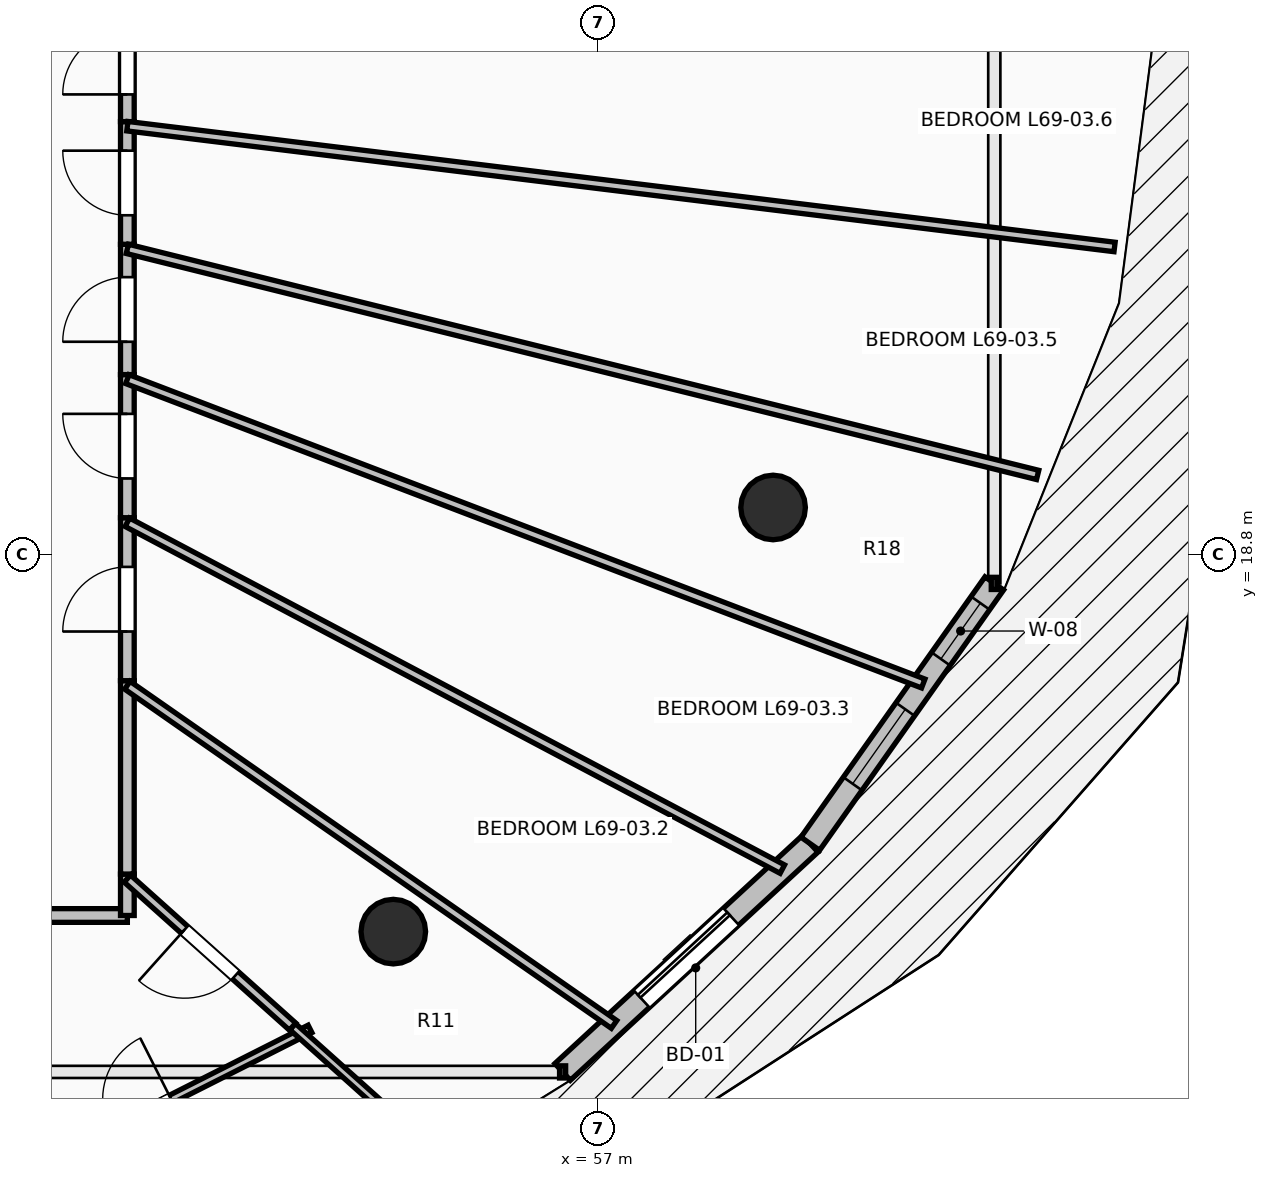
"""IFC4 building model, lengths in metres.
Left out: names, types, materials, properties, quantities, classifications, styles, units other than length and angle.
Written with IfcOpenShell. Run it as: python <this file> out.ifc"""

import sys

from ifc_helpers import new_model, si_unit, direction, frame, frame_2d, origin, origin_2d, place, context, subcontext, project, spatial, rectangle, circle, extrude, element, fill, save


model = new_model("IFC4")
c1 = context("Model", 3, precision=1e-05, world=origin(), true_north=direction((0.0, 1.0)))
c2 = subcontext(c1, "Body", "Model", "MODEL_VIEW")
j1 = project(units=[si_unit("LENGTHUNIT", "METRE"), si_unit("PLANEANGLEUNIT", "RADIAN")], contexts=[c1])
p1 = place(None, origin())
s1 = spatial("IfcSite", under=j1, at=p1, CompositionType="ELEMENT")
p2 = place(p1, origin())
s2 = spatial("IfcBuilding", under=s1, at=p2, CompositionType="ELEMENT")
p3 = place(p2, frame((0.0, 0.0, 255.55)))
s3 = spatial("IfcBuildingStorey", under=s2, at=p3, CompositionType="ELEMENT", Elevation=255.55)
for number, where, z_axis, x_axis in (
    (1, (54.299, 13.838, 0.0), (0.0, 0.0, 1.0), (0.707, -0.707, 0.0)),
    (2, (59.295, 19.418, 0.0), (0.0, 0.0, 1.0), (0.924, -0.383, 0.0)),
):
    element("IfcColumn", number, at=place(p3, frame(where, z_axis=z_axis, x_axis=x_axis)), inside=s3, PredefinedType="COLUMN", context=c2, shape_type="SweptSolid", body=[
        extrude(circle(Radius=0.425, at=origin_2d()), origin(), (0.0, 0.0, 1.0), 3.55),
    ])
p4 = place(p3, frame((56.526, 11.992, 0.0), z_axis=(0.0, 0.0, 1.0), x_axis=(0.735445373611, 0.677584018727, 0.0)))
e3 = element("IfcWall", 3, at=p4, inside=s3, PredefinedType="STANDARD", context=c2, shape_type="SweptSolid", body=[
    extrude(rectangle(XDim=4.43, YDim=0.3, at=frame_2d((2.215, 0.0))), origin(), (0.0, 0.0, 1.0), 3.29),
])
p5 = place(p4, frame((1.415, 0.0, 0.0)))
e4 = element("IfcOpeningElement", 4, at=p5, cuts=e3, PredefinedType="OPENING", context=c2, shape_type="SweptSolid", body=[
    extrude(rectangle(XDim=1.6, YDim=2.3, at=frame_2d((0.8, 1.15))), frame((0.0, 0.165, 0.0), z_axis=(0.0, -1.0, 0.0), x_axis=(1.0, 0.0, 0.0)), (0.0, 0.0, 1.0), 0.33),
])
p6 = place(p3, frame((59.784, 14.994, 0.0), z_axis=(0.0, 0.0, 1.0), x_axis=(0.577261247247, 0.816559521668, 0.0)))
e5 = element("IfcWall", 5, at=p6, inside=s3, PredefinedType="STANDARD", context=c2, shape_type="SweptSolid", body=[
    extrude(rectangle(XDim=4.194, YDim=0.3, at=frame_2d((2.097, 0.0))), origin(), (0.0, 0.0, 1.0), 3.29),
])
p7 = place(p6, frame((0.966, 0.0, 0.85)))
e6 = element("IfcOpeningElement", 6, at=p7, cuts=e5, PredefinedType="OPENING", context=c2, shape_type="SweptSolid", body=[
    extrude(rectangle(XDim=1.2, YDim=1.95, at=frame_2d((0.6, 0.975))), frame((0.0, 0.165, 0.0), z_axis=(0.0, -1.0, 0.0), x_axis=(1.0, 0.0, 0.0)), (0.0, 0.0, 1.0), 0.33),
])
p8 = place(p6, frame((2.977, 0.0, 0.85)))
e7 = element("IfcOpeningElement", 7, at=p8, cuts=e5, PredefinedType="OPENING", context=c2, shape_type="SweptSolid", body=[
    extrude(rectangle(XDim=0.9, YDim=1.8, at=frame_2d((0.45, 0.9))), frame((0.0, 0.165, 0.0), z_axis=(0.0, -1.0, 0.0), x_axis=(1.0, 0.0, 0.0)), (0.0, 0.0, 1.0), 0.33),
])
p9 = place(p3, frame((45.936, 14.05, 0.0), z_axis=(0.0, 0.0, 1.0), x_axis=(1.0, 0.0, 0.0)))
e8 = element("IfcWall", 8, at=p9, inside=s3, PredefinedType="PARTITIONING", context=c2, shape_type="SweptSolid", body=[
    extrude(rectangle(XDim=4.864, YDim=0.18, at=frame_2d((2.432, 0.0))), origin(), (0.0, 0.0, 1.0), 2.482),
])
p10 = place(p9, frame((1.932, 0.0, 0.0)))
e9 = element("IfcOpeningElement", 9, at=p10, cuts=e8, PredefinedType="OPENING", context=c2, shape_type="SweptSolid", body=[
    extrude(rectangle(XDim=1.0, YDim=2.15, at=frame_2d((0.5, 1.075))), frame((0.0, 0.105, 0.0), z_axis=(0.0, -1.0, 0.0), x_axis=(1.0, 0.0, 0.0)), (0.0, 0.0, 1.0), 0.21),
])
p11 = place(p3, frame((50.8, 14.05, 0.0), z_axis=(0.0, 0.0, 1.0), x_axis=(0.0, 1.0, 0.0)))
e10 = element("IfcWall", 10, at=p11, inside=s3, PredefinedType="PARTITIONING", context=c2, shape_type="SweptSolid", body=[
    extrude(rectangle(XDim=0.545, YDim=0.18, at=frame_2d((0.272, 0.0))), origin(), (0.0, 0.0, 1.0), 3.022),
])
p12 = place(p3, frame((50.8, 14.595, 0.0), z_axis=(0.0, 0.0, 1.0), x_axis=(0.0, 1.0, 0.0)))
e11 = element("IfcWall", 11, at=p12, inside=s3, PredefinedType="PARTITIONING", context=c2, shape_type="SweptSolid", body=[
    extrude(rectangle(XDim=2.544, YDim=0.18, at=frame_2d((1.272, 0.0))), origin(), (0.0, 0.0, 1.0), 2.482),
])
p13 = place(p3, frame((50.8, 17.139, 0.0), z_axis=(0.0, 0.0, 1.0), x_axis=(0.0, 1.0, 0.0)))
e12 = element("IfcWall", 12, at=p13, inside=s3, PredefinedType="PARTITIONING", context=c2, shape_type="SweptSolid", body=[
    extrude(rectangle(XDim=2.144, YDim=0.18, at=frame_2d((1.072, 0.0))), origin(), (0.0, 0.0, 1.0), 3.29),
])
p14 = place(p13, frame((0.647, 0.0, 0.0)))
e13 = element("IfcOpeningElement", 13, at=p14, cuts=e12, PredefinedType="OPENING", context=c2, shape_type="SweptSolid", body=[
    extrude(rectangle(XDim=0.85, YDim=2.1, at=frame_2d((0.425, 1.05))), frame((0.0, 0.105, 0.0), z_axis=(0.0, -1.0, 0.0), x_axis=(1.0, 0.0, 0.0)), (0.0, 0.0, 1.0), 0.21),
])
p15 = place(p3, frame((50.8, 19.283, 0.0), z_axis=(0.0, 0.0, 1.0), x_axis=(0.0, 1.0, 0.0)))
e14 = element("IfcWall", 14, at=p15, inside=s3, PredefinedType="PARTITIONING", context=c2, shape_type="SweptSolid", body=[
    extrude(rectangle(XDim=1.883, YDim=0.18, at=frame_2d((0.941, 0.0))), origin(), (0.0, 0.0, 1.0), 3.29),
])
p16 = place(p15, frame((0.517, 0.0, 0.0)))
e15 = element("IfcOpeningElement", 15, at=p16, cuts=e14, PredefinedType="OPENING", context=c2, shape_type="SweptSolid", body=[
    extrude(rectangle(XDim=0.85, YDim=2.1, at=frame_2d((0.425, 1.05))), frame((0.0, 0.105, 0.0), z_axis=(0.0, -1.0, 0.0), x_axis=(1.0, 0.0, 0.0)), (0.0, 0.0, 1.0), 0.21),
])
p17 = place(p3, frame((50.8, 21.166, 0.0), z_axis=(0.0, 0.0, 1.0), x_axis=(0.0, 1.0, 0.0)))
e16 = element("IfcWall", 16, at=p17, inside=s3, PredefinedType="PARTITIONING", context=c2, shape_type="SweptSolid", body=[
    extrude(rectangle(XDim=1.714, YDim=0.18, at=frame_2d((0.857, 0.0))), origin(), (0.0, 0.0, 1.0), 3.29),
])
p18 = place(p17, frame((0.432, 0.0, 0.0)))
e17 = element("IfcOpeningElement", 17, at=p18, cuts=e16, PredefinedType="OPENING", context=c2, shape_type="SweptSolid", body=[
    extrude(rectangle(XDim=0.85, YDim=2.1, at=frame_2d((0.425, 1.05))), frame((0.0, 0.105, 0.0), z_axis=(0.0, -1.0, 0.0), x_axis=(1.0, 0.0, 0.0)), (0.0, 0.0, 1.0), 0.21),
])
p19 = place(p3, frame((50.8, 22.88, 0.0), z_axis=(0.0, 0.0, 1.0), x_axis=(0.0, 1.0, 0.0)))
e18 = element("IfcWall", 18, at=p19, inside=s3, PredefinedType="PARTITIONING", context=c2, shape_type="SweptSolid", body=[
    extrude(rectangle(XDim=1.614, YDim=0.18, at=frame_2d((0.807, 0.0))), origin(), (0.0, 0.0, 1.0), 3.29),
])
p20 = place(p19, frame((0.382, 0.0, 0.0)))
e19 = element("IfcOpeningElement", 19, at=p20, cuts=e18, PredefinedType="OPENING", context=c2, shape_type="SweptSolid", body=[
    extrude(rectangle(XDim=0.85, YDim=2.1, at=frame_2d((0.425, 1.05))), frame((0.0, 0.105, 0.0), z_axis=(0.0, -1.0, 0.0), x_axis=(1.0, 0.0, 0.0)), (0.0, 0.0, 1.0), 0.21),
])
p21 = place(p3, frame((50.8, 24.494, 0.0), z_axis=(0.0, 0.0, 1.0), x_axis=(0.0, 1.0, 0.0)))
e20 = element("IfcWall", 20, at=p21, inside=s3, PredefinedType="PARTITIONING", context=c2, shape_type="SweptSolid", body=[
    extrude(rectangle(XDim=1.566, YDim=0.18, at=frame_2d((0.783, 0.0))), origin(), (0.0, 0.0, 1.0), 3.29),
])
p22 = place(p21, frame((0.358, 0.0, 0.0)))
e21 = element("IfcOpeningElement", 21, at=p22, cuts=e20, PredefinedType="OPENING", context=c2, shape_type="SweptSolid", body=[
    extrude(rectangle(XDim=0.85, YDim=2.1, at=frame_2d((0.425, 1.05))), frame((0.0, 0.105, 0.0), z_axis=(0.0, -1.0, 0.0), x_axis=(1.0, 0.0, 0.0)), (0.0, 0.0, 1.0), 0.21),
])
p23 = place(p3, frame((48.744, 10.305, 0.0), z_axis=(0.0, 0.0, 1.0), x_axis=(0.892523078089, 0.45100172403, 0.0)))
e22 = element("IfcWall", 22, at=p23, inside=s3, PredefinedType="PARTITIONING", context=c2, shape_type="SweptSolid", body=[
    extrude(rectangle(XDim=4.996, YDim=0.11, at=frame_2d((2.498, 0.0))), origin(), (0.0, 0.0, 1.0), 3.29),
])
p24 = place(p23, frame((2.048, 0.0, 0.0)))
e23 = element("IfcOpeningElement", 23, at=p24, cuts=e22, PredefinedType="OPENING", context=c2, shape_type="SweptSolid", body=[
    extrude(rectangle(XDim=0.9, YDim=2.1, at=frame_2d((0.45, 1.05))), frame((0.0, 0.07, 0.0), z_axis=(0.0, -1.0, 0.0), x_axis=(1.0, 0.0, 0.0)), (0.0, 0.0, 1.0), 0.14),
])
p25 = place(p3, frame((52.974, 12.588, 0.0), z_axis=(0.0, 0.0, 1.0), x_axis=(0.744980199756, -0.667086577568, 0.0)))
e24 = element("IfcWall", 24, at=p25, inside=s3, PredefinedType="PARTITIONING", context=c2, shape_type="SweptSolid", body=[
    extrude(rectangle(XDim=2.617, YDim=0.11, at=frame_2d((1.309, 0.0))), origin(), (0.0, 0.0, 1.0), 3.29),
])
p26 = place(p3, frame((52.974, 12.588, 0.0), z_axis=(0.0, 0.0, 1.0), x_axis=(-0.744943619707, 0.667127426702, 0.0)))
e25 = element("IfcWall", 25, at=p26, inside=s3, PredefinedType="PARTITIONING", context=c2, shape_type="SweptSolid", body=[
    extrude(rectangle(XDim=2.918, YDim=0.125, at=frame_2d((1.459, 0.0))), origin(), (0.0, 0.0, 1.0), 2.874),
])
p27 = place(p26, frame((1.009, 0.0, 0.0)))
e26 = element("IfcOpeningElement", 26, at=p27, cuts=e25, PredefinedType="OPENING", context=c2, shape_type="SweptSolid", body=[
    extrude(rectangle(XDim=0.9, YDim=2.1, at=frame_2d((0.45, 1.05))), frame((0.0, 0.077, 0.0), z_axis=(0.0, -1.0, 0.0), x_axis=(1.0, 0.0, 0.0)), (0.0, 0.0, 1.0), 0.155),
])
p28 = place(p3, frame((57.203, 12.617, 0.0), z_axis=(0.0, 0.0, 1.0), x_axis=(-0.820423513177, 0.571756293386, 0.0)))
e27 = element("IfcWall", 27, at=p28, inside=s3, PredefinedType="PARTITIONING", context=c2, shape_type="SweptSolid", body=[
    extrude(rectangle(XDim=7.804, YDim=0.125, at=frame_2d((3.902, 0.0))), origin(), (0.0, 0.0, 1.0), 2.874),
])
p29 = place(p3, frame((59.417, 14.66, 0.0), z_axis=(0.0, 0.0, 1.0), x_axis=(-0.883742233358, 0.467974000325, 0.0)))
e28 = element("IfcWall", 28, at=p29, inside=s3, PredefinedType="PARTITIONING", context=c2, shape_type="SweptSolid", body=[
    extrude(rectangle(XDim=9.75, YDim=0.125, at=frame_2d((4.875, 0.0))), origin(), (0.0, 0.0, 1.0), 2.874),
])
p30 = place(p3, frame((61.271, 17.102, 0.0), z_axis=(0.0, 0.0, 1.0), x_axis=(-0.934042646632, 0.357161496066, 0.0)))
e29 = element("IfcWall", 29, at=p30, inside=s3, PredefinedType="PARTITIONING", context=c2, shape_type="SweptSolid", body=[
    extrude(rectangle(XDim=11.21, YDim=0.125, at=frame_2d((5.605, 0.0))), origin(), (0.0, 0.0, 1.0), 2.874),
])
p31 = place(p3, frame((62.776, 19.846, 0.0), z_axis=(0.0, 0.0, 1.0), x_axis=(-0.970519565335, 0.241022350211, 0.0)))
e30 = element("IfcWall", 30, at=p31, inside=s3, PredefinedType="PARTITIONING", context=c2, shape_type="SweptSolid", body=[
    extrude(rectangle(XDim=12.34, YDim=0.125, at=frame_2d((6.17, 0.0))), origin(), (0.0, 0.0, 1.0), 2.482),
])
p32 = place(p3, frame((63.788, 22.845, 0.0), z_axis=(0.0, 0.0, 1.0), x_axis=(-0.992598006299, 0.121446275738, 0.0)))
e31 = element("IfcWall", 31, at=p32, inside=s3, PredefinedType="PARTITIONING", context=c2, shape_type="SweptSolid", body=[
    extrude(rectangle(XDim=13.085, YDim=0.125, at=frame_2d((6.542, 0.0))), origin(), (0.0, 0.0, 1.0), 2.482),
])
p33 = place(p5, origin())
e32 = element("IfcDoor", 32, at=p33, inside=s3, OperationType="SLIDING_TO_LEFT", PredefinedType="DOOR", context=c2, shape_type="SweptSolid", body=[
    extrude(rectangle(XDim=1.6, YDim=2.3, at=frame_2d((0.8, 1.15))), frame((0.0, 0.025, 0.0), z_axis=(0.0, -1.0, 0.0), x_axis=(1.0, 0.0, 0.0)), (0.0, 0.0, 1.0), 0.05),
])
fill(e4, e32)
p34 = place(p7, origin())
e33 = element("IfcWindow", 33, at=p34, inside=s3, PartitioningType="SINGLE_PANEL", PredefinedType="WINDOW", context=c2, shape_type="SweptSolid", body=[
    extrude(rectangle(XDim=1.2, YDim=1.95, at=frame_2d((0.6, 0.975))), frame((0.0, 0.03, 0.0), z_axis=(0.0, -1.0, 0.0), x_axis=(1.0, 0.0, 0.0)), (0.0, 0.0, 1.0), 0.06),
])
fill(e6, e33)
p35 = place(p8, origin())
e34 = element("IfcWindow", 34, at=p35, inside=s3, PartitioningType="SINGLE_PANEL", PredefinedType="WINDOW", context=c2, shape_type="SweptSolid", body=[
    extrude(rectangle(XDim=0.9, YDim=1.8, at=frame_2d((0.45, 0.9))), frame((0.0, 0.03, 0.0), z_axis=(0.0, -1.0, 0.0), x_axis=(1.0, 0.0, 0.0)), (0.0, 0.0, 1.0), 0.06),
])
fill(e7, e34)
p36 = place(p24, origin())
e35 = element("IfcDoor", 35, at=p36, inside=s3, OperationType="SINGLE_SWING_RIGHT", PredefinedType="DOOR", context=c2, shape_type="SweptSolid", body=[
    extrude(rectangle(XDim=0.9, YDim=2.1, at=frame_2d((0.45, 1.05))), frame((0.0, 0.025, 0.0), z_axis=(0.0, -1.0, 0.0), x_axis=(1.0, 0.0, 0.0)), (0.0, 0.0, 1.0), 0.05),
])
fill(e23, e35)
p37 = place(p27, origin())
e36 = element("IfcDoor", 36, at=p37, inside=s3, OperationType="SINGLE_SWING_RIGHT", PredefinedType="DOOR", context=c2, shape_type="SweptSolid", body=[
    extrude(rectangle(XDim=0.9, YDim=2.1, at=frame_2d((0.45, 1.05))), frame((0.0, 0.025, 0.0), z_axis=(0.0, -1.0, 0.0), x_axis=(1.0, 0.0, 0.0)), (0.0, 0.0, 1.0), 0.05),
])
fill(e26, e36)
p38 = place(p14, origin())
e37 = element("IfcDoor", 37, at=p38, inside=s3, OperationType="SINGLE_SWING_LEFT", PredefinedType="DOOR", context=c2, shape_type="SweptSolid", body=[
    extrude(rectangle(XDim=0.85, YDim=2.1, at=frame_2d((0.425, 1.05))), frame((0.0, 0.025, 0.0), z_axis=(0.0, -1.0, 0.0), x_axis=(1.0, 0.0, 0.0)), (0.0, 0.0, 1.0), 0.05),
])
fill(e13, e37)
p39 = place(p16, origin())
e38 = element("IfcDoor", 38, at=p39, inside=s3, OperationType="SINGLE_SWING_RIGHT", PredefinedType="DOOR", context=c2, shape_type="SweptSolid", body=[
    extrude(rectangle(XDim=0.85, YDim=2.1, at=frame_2d((0.425, 1.05))), frame((0.0, 0.025, 0.0), z_axis=(0.0, -1.0, 0.0), x_axis=(1.0, 0.0, 0.0)), (0.0, 0.0, 1.0), 0.05),
])
fill(e15, e38)
p40 = place(p18, origin())
e39 = element("IfcDoor", 39, at=p40, inside=s3, OperationType="SINGLE_SWING_LEFT", PredefinedType="DOOR", context=c2, shape_type="SweptSolid", body=[
    extrude(rectangle(XDim=0.85, YDim=2.1, at=frame_2d((0.425, 1.05))), frame((0.0, 0.025, 0.0), z_axis=(0.0, -1.0, 0.0), x_axis=(1.0, 0.0, 0.0)), (0.0, 0.0, 1.0), 0.05),
])
fill(e17, e39)
p41 = place(p20, origin())
e40 = element("IfcDoor", 40, at=p41, inside=s3, OperationType="SINGLE_SWING_RIGHT", PredefinedType="DOOR", context=c2, shape_type="SweptSolid", body=[
    extrude(rectangle(XDim=0.85, YDim=2.1, at=frame_2d((0.425, 1.05))), frame((0.0, 0.025, 0.0), z_axis=(0.0, -1.0, 0.0), x_axis=(1.0, 0.0, 0.0)), (0.0, 0.0, 1.0), 0.05),
])
fill(e19, e40)
p42 = place(p22, origin())
e41 = element("IfcDoor", 41, at=p42, inside=s3, OperationType="SINGLE_SWING_LEFT", PredefinedType="DOOR", context=c2, shape_type="SweptSolid", body=[
    extrude(rectangle(XDim=0.85, YDim=2.1, at=frame_2d((0.425, 1.05))), frame((0.0, 0.025, 0.0), z_axis=(0.0, -1.0, 0.0), x_axis=(1.0, 0.0, 0.0)), (0.0, 0.0, 1.0), 0.05),
])
fill(e21, e41)
save(model, sys.argv[1])
